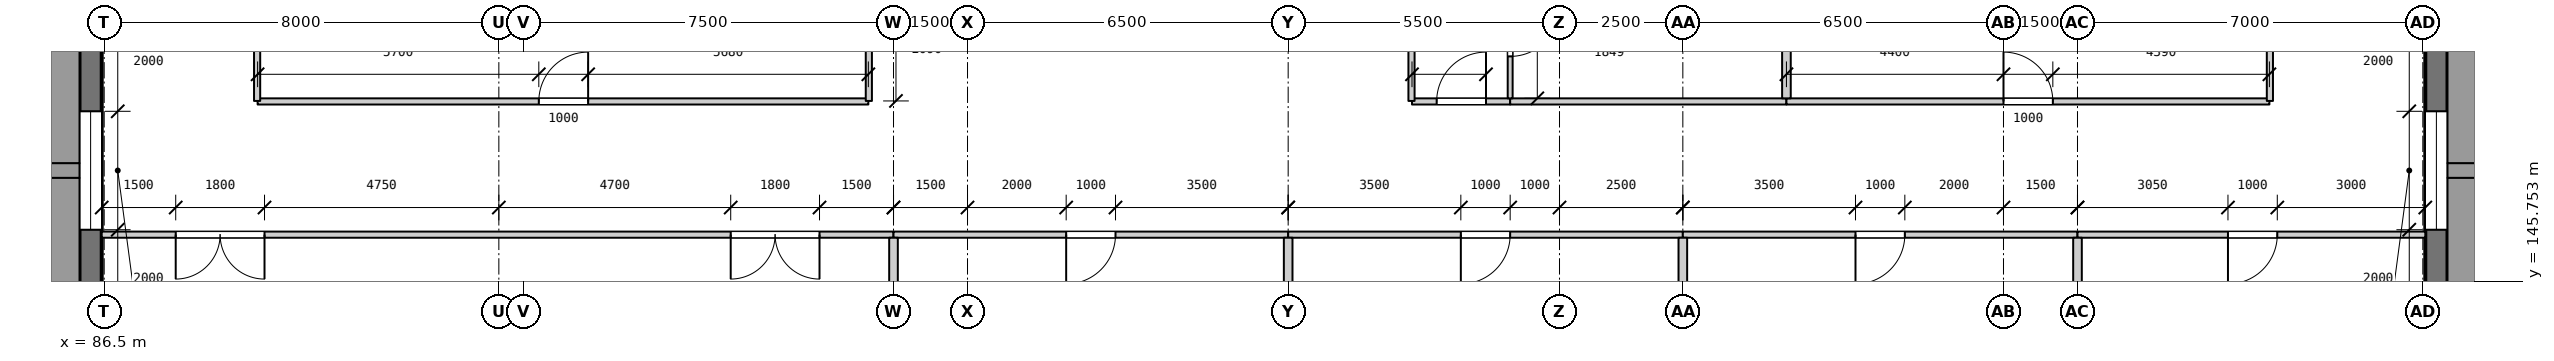
"""IFC4 building model, lengths in metres.
Left out: names, types, materials, properties, quantities, classifications, styles, units other than length and angle.
Written with IfcOpenShell. Run it as: python <this file> out.ifc"""

import sys

from ifc_helpers import new_model, si_unit, direction, frame, frame_2d, origin, place, context, subcontext, project, spatial, rectangle, extrude, element, fill, save


model = new_model("IFC4")
c1 = context("Model", 3, precision=1e-05, world=origin(), true_north=direction((0.0, 1.0)))
c2 = subcontext(c1, "Body", "Model", "MODEL_VIEW")
j1 = project(units=[si_unit("LENGTHUNIT", "METRE"), si_unit("PLANEANGLEUNIT", "RADIAN")], contexts=[c1])
p1 = place(None, origin())
s1 = spatial("IfcSite", under=j1, at=p1, CompositionType="ELEMENT")
p2 = place(p1, origin())
s2 = spatial("IfcBuilding", under=s1, at=p2, CompositionType="ELEMENT")
p3 = place(p2, frame((0.0, 0.0, 14.4)))
s3 = spatial("IfcBuildingStorey", under=s2, at=p3, CompositionType="ELEMENT", Elevation=14.4)
for number, where, z_axis, x_axis in (
    (1, (86.125, 130.25, 4.2), (0.0, 0.0, 1.0), (0.0, 1.0, 0.0)),
    (2, (133.875, 165.75, 4.2), (0.0, 0.0, 1.0), (0.0, -1.0, 0.0)),
):
    element("IfcWall", number, at=place(p3, frame(where, z_axis=z_axis, x_axis=x_axis)), inside=s3, PredefinedType="PARAPET", context=c2, shape_type="SweptSolid", body=[
        extrude(rectangle(XDim=35.5, YDim=0.25, at=frame_2d((17.75, 0.0))), origin(), (0.0, 0.0, 1.0), 1.1),
    ])
p4 = place(p3, frame((86.225, 144.8, 0.0), z_axis=(0.0, 0.0, 1.0), x_axis=(0.0, 1.0, 0.0)))
e3 = element("IfcWall", 3, at=p4, inside=s3, PredefinedType="SOLIDWALL", context=c2, shape_type="SweptSolid", body=[
    extrude(rectangle(XDim=6.4, YDim=0.45, at=frame_2d((3.2, 0.0))), origin(), (0.0, 0.0, 1.0), 3.1),
])
p5 = place(p4, frame((2.0, 0.0, 0.9)))
e4 = element("IfcOpeningElement", 4, at=p5, cuts=e3, PredefinedType="OPENING", context=c2, shape_type="SweptSolid", body=[
    extrude(rectangle(XDim=2.4, YDim=1.6, at=frame_2d((1.2, 0.8))), frame((0.0, 0.235, 0.0), z_axis=(0.0, -1.0, 0.0), x_axis=(1.0, 0.0, 0.0)), (0.0, 0.0, 1.0), 0.47),
])
p6 = place(p3, frame((133.775, 151.2, 0.0), z_axis=(0.0, 0.0, 1.0), x_axis=(0.0, -1.0, 0.0)))
e5 = element("IfcWall", 5, at=p6, inside=s3, PredefinedType="SOLIDWALL", context=c2, shape_type="SweptSolid", body=[
    extrude(rectangle(XDim=6.4, YDim=0.45, at=frame_2d((3.2, 0.0))), origin(), (0.0, 0.0, 1.0), 3.1),
])
p7 = place(p6, frame((2.0, 0.0, 0.9)))
e6 = element("IfcOpeningElement", 6, at=p7, cuts=e5, PredefinedType="OPENING", context=c2, shape_type="SweptSolid", body=[
    extrude(rectangle(XDim=2.4, YDim=1.6, at=frame_2d((1.2, 0.8))), frame((0.0, 0.235, 0.0), z_axis=(0.0, -1.0, 0.0), x_axis=(1.0, 0.0, 0.0)), (0.0, 0.0, 1.0), 0.47),
])
p8 = place(p3, frame((86.45, 146.7, 0.0), z_axis=(0.0, 0.0, 1.0), x_axis=(1.0, 0.0, 0.0)))
e7 = element("IfcWall", 7, at=p8, inside=s3, PredefinedType="PARTITIONING", context=c2, shape_type="SweptSolid", body=[
    extrude(rectangle(XDim=16.05, YDim=0.125, at=frame_2d((8.025, 0.0))), origin(), (0.0, 0.0, 1.0), 3.9),
])
p9 = place(p8, frame((1.5, 0.0, 0.0)))
e8 = element("IfcOpeningElement", 8, at=p9, cuts=e7, PredefinedType="OPENING", context=c2, shape_type="SweptSolid", body=[
    extrude(rectangle(XDim=1.8, YDim=2.1, at=frame_2d((0.9, 1.05))), frame((0.0, 0.073, 0.0), z_axis=(0.0, -1.0, 0.0), x_axis=(1.0, 0.0, 0.0)), (0.0, 0.0, 1.0), 0.145),
])
p10 = place(p8, frame((12.75, 0.0, 0.0)))
e9 = element("IfcOpeningElement", 9, at=p10, cuts=e7, PredefinedType="OPENING", context=c2, shape_type="SweptSolid", body=[
    extrude(rectangle(XDim=1.8, YDim=2.1, at=frame_2d((0.9, 1.05))), frame((0.0, 0.073, 0.0), z_axis=(0.0, -1.0, 0.0), x_axis=(1.0, 0.0, 0.0)), (0.0, 0.0, 1.0), 0.145),
])
p11 = place(p3, frame((102.5, 146.7, 0.0), z_axis=(0.0, 0.0, 1.0), x_axis=(1.0, 0.0, 0.0)))
e10 = element("IfcWall", 10, at=p11, inside=s3, PredefinedType="PARTITIONING", context=c2, shape_type="SweptSolid", body=[
    extrude(rectangle(XDim=8.0, YDim=0.125, at=frame_2d((4.0, 0.0))), origin(), (0.0, 0.0, 1.0), 3.9),
])
p12 = place(p11, frame((3.5, 0.0, 0.0)))
e11 = element("IfcOpeningElement", 11, at=p12, cuts=e10, PredefinedType="OPENING", context=c2, shape_type="SweptSolid", body=[
    extrude(rectangle(XDim=1.0, YDim=2.1, at=frame_2d((0.5, 1.05))), frame((0.0, 0.073, 0.0), z_axis=(0.0, -1.0, 0.0), x_axis=(1.0, 0.0, 0.0)), (0.0, 0.0, 1.0), 0.145),
])
p13 = place(p3, frame((110.5, 146.7, 0.0), z_axis=(0.0, 0.0, 1.0), x_axis=(1.0, 0.0, 0.0)))
e12 = element("IfcWall", 12, at=p13, inside=s3, PredefinedType="PARTITIONING", context=c2, shape_type="SweptSolid", body=[
    extrude(rectangle(XDim=8.0, YDim=0.125, at=frame_2d((4.0, 0.0))), origin(), (0.0, 0.0, 1.0), 3.9),
])
p14 = place(p13, frame((3.5, 0.0, 0.0)))
e13 = element("IfcOpeningElement", 13, at=p14, cuts=e12, PredefinedType="OPENING", context=c2, shape_type="SweptSolid", body=[
    extrude(rectangle(XDim=1.0, YDim=2.1, at=frame_2d((0.5, 1.05))), frame((0.0, 0.073, 0.0), z_axis=(0.0, -1.0, 0.0), x_axis=(1.0, 0.0, 0.0)), (0.0, 0.0, 1.0), 0.145),
])
p15 = place(p3, frame((118.5, 146.7, 0.0), z_axis=(0.0, 0.0, 1.0), x_axis=(1.0, 0.0, 0.0)))
e14 = element("IfcWall", 14, at=p15, inside=s3, PredefinedType="PARTITIONING", context=c2, shape_type="SweptSolid", body=[
    extrude(rectangle(XDim=8.0, YDim=0.125, at=frame_2d((4.0, 0.0))), origin(), (0.0, 0.0, 1.0), 3.9),
])
p16 = place(p15, frame((3.5, 0.0, 0.0)))
e15 = element("IfcOpeningElement", 15, at=p16, cuts=e14, PredefinedType="OPENING", context=c2, shape_type="SweptSolid", body=[
    extrude(rectangle(XDim=1.0, YDim=2.1, at=frame_2d((0.5, 1.05))), frame((0.0, 0.073, 0.0), z_axis=(0.0, -1.0, 0.0), x_axis=(1.0, 0.0, 0.0)), (0.0, 0.0, 1.0), 0.145),
])
p17 = place(p3, frame((126.5, 146.7, 0.0), z_axis=(0.0, 0.0, 1.0), x_axis=(1.0, 0.0, 0.0)))
e16 = element("IfcWall", 16, at=p17, inside=s3, PredefinedType="PARTITIONING", context=c2, shape_type="SweptSolid", body=[
    extrude(rectangle(XDim=7.05, YDim=0.125, at=frame_2d((3.525, 0.0))), origin(), (0.0, 0.0, 1.0), 3.9),
])
p18 = place(p17, frame((3.05, 0.0, 0.0)))
e17 = element("IfcOpeningElement", 17, at=p18, cuts=e16, PredefinedType="OPENING", context=c2, shape_type="SweptSolid", body=[
    extrude(rectangle(XDim=1.0, YDim=2.1, at=frame_2d((0.5, 1.05))), frame((0.0, 0.073, 0.0), z_axis=(0.0, -1.0, 0.0), x_axis=(1.0, 0.0, 0.0)), (0.0, 0.0, 1.0), 0.145),
])
p19 = place(p3, frame((89.61, 149.4, 0.0), z_axis=(0.0, 0.0, 1.0), x_axis=(1.0, 0.0, 0.0)))
e18 = element("IfcWall", 18, at=p19, inside=s3, PredefinedType="PARTITIONING", context=c2, shape_type="SweptSolid", body=[
    extrude(rectangle(XDim=12.38, YDim=0.125, at=frame_2d((6.19, 0.0))), origin(), (0.0, 0.0, 1.0), 3.9),
])
p20 = place(p19, frame((5.7, 0.0, 0.0)))
e19 = element("IfcOpeningElement", 19, at=p20, cuts=e18, PredefinedType="OPENING", context=c2, shape_type="SweptSolid", body=[
    extrude(rectangle(XDim=1.0, YDim=2.1, at=frame_2d((0.5, 1.05))), frame((0.0, 0.073, 0.0), z_axis=(0.0, -1.0, 0.0), x_axis=(1.0, 0.0, 0.0)), (0.0, 0.0, 1.0), 0.145),
])
p21 = place(p3, frame((113.01, 149.4, 0.0), z_axis=(0.0, 0.0, 1.0), x_axis=(1.0, 0.0, 0.0)))
e20 = element("IfcWall", 20, at=p21, inside=s3, PredefinedType="PARTITIONING", context=c2, shape_type="SweptSolid", body=[
    extrude(rectangle(XDim=1.99, YDim=0.125, at=frame_2d((0.995, 0.0))), origin(), (0.0, 0.0, 1.0), 3.9),
])
p22 = place(p21, frame((0.5, 0.0, 0.0)))
e21 = element("IfcOpeningElement", 21, at=p22, cuts=e20, PredefinedType="OPENING", context=c2, shape_type="SweptSolid", body=[
    extrude(rectangle(XDim=1.0, YDim=2.1, at=frame_2d((0.5, 1.05))), frame((0.0, 0.073, 0.0), z_axis=(0.0, -1.0, 0.0), x_axis=(1.0, 0.0, 0.0)), (0.0, 0.0, 1.0), 0.145),
])
p23 = place(p3, frame((115.0, 149.4, 0.0), z_axis=(0.0, 0.0, 1.0), x_axis=(1.0, 0.0, 0.0)))
e22 = element("IfcWall", 22, at=p23, inside=s3, PredefinedType="PARTITIONING", context=c2, shape_type="SweptSolid", body=[
    extrude(rectangle(XDim=5.6, YDim=0.125, at=frame_2d((2.8, 0.0))), origin(), (0.0, 0.0, 1.0), 3.9),
])
p24 = place(p3, frame((120.6, 149.4, 0.0), z_axis=(0.0, 0.0, 1.0), x_axis=(1.0, 0.0, 0.0)))
e23 = element("IfcWall", 23, at=p24, inside=s3, PredefinedType="PARTITIONING", context=c2, shape_type="SweptSolid", body=[
    extrude(rectangle(XDim=9.79, YDim=0.125, at=frame_2d((4.895, 0.0))), origin(), (0.0, 0.0, 1.0), 3.9),
])
p25 = place(p24, frame((4.4, 0.0, 0.0)))
e24 = element("IfcOpeningElement", 24, at=p25, cuts=e23, PredefinedType="OPENING", context=c2, shape_type="SweptSolid", body=[
    extrude(rectangle(XDim=1.0, YDim=2.1, at=frame_2d((0.5, 1.05))), frame((0.0, 0.073, 0.0), z_axis=(0.0, -1.0, 0.0), x_axis=(1.0, 0.0, 0.0)), (0.0, 0.0, 1.0), 0.145),
])
p26 = place(p3, frame((89.6, 149.41, 0.0), z_axis=(0.0, 0.0, 1.0), x_axis=(0.0, 1.0, 0.0)))
e25 = element("IfcWall", 25, at=p26, inside=s3, PredefinedType="PARTITIONING", context=c2, shape_type="SweptSolid", body=[
    extrude(rectangle(XDim=8.29, YDim=0.125, at=frame_2d((4.145, 0.0))), origin(), (0.0, 0.0, 1.0), 3.9),
])
p27 = place(p3, frame((102.0, 149.41, 0.0), z_axis=(0.0, 0.0, 1.0), x_axis=(0.0, 1.0, 0.0)))
e26 = element("IfcWall", 26, at=p27, inside=s3, PredefinedType="PARTITIONING", context=c2, shape_type="SweptSolid", body=[
    extrude(rectangle(XDim=8.29, YDim=0.125, at=frame_2d((4.145, 0.0))), origin(), (0.0, 0.0, 1.0), 3.9),
])
p28 = place(p27, frame((3.65, 0.0, 0.0)))
e27 = element("IfcOpeningElement", 27, at=p28, cuts=e26, PredefinedType="OPENING", context=c2, shape_type="SweptSolid", body=[
    extrude(rectangle(XDim=1.0, YDim=2.1, at=frame_2d((0.5, 1.05))), frame((0.0, 0.073, 0.0), z_axis=(0.0, -1.0, 0.0), x_axis=(1.0, 0.0, 0.0)), (0.0, 0.0, 1.0), 0.145),
])
for number, where, z_axis, x_axis in (
    (28, (102.5, 144.8, 0.0), (0.0, 0.0, 1.0), (0.0, 1.0, 0.0)),
    (29, (110.5, 144.8, 0.0), (0.0, 0.0, 1.0), (0.0, 1.0, 0.0)),
):
    element("IfcWall", number, at=place(p3, frame(where, z_axis=z_axis, x_axis=x_axis)), inside=s3, PredefinedType="PARTITIONING", context=c2, shape_type="SweptSolid", body=[
        extrude(rectangle(XDim=1.837, YDim=0.175, at=frame_2d((0.919, 0.0))), origin(), (0.0, 0.0, 1.0), 3.1),
    ])
p29 = place(p3, frame((113.0, 149.41, 0.0), z_axis=(0.0, 0.0, 1.0), x_axis=(0.0, 1.0, 0.0)))
e30 = element("IfcWall", 30, at=p29, inside=s3, PredefinedType="PARTITIONING", context=c2, shape_type="SweptSolid", body=[
    extrude(rectangle(XDim=8.29, YDim=0.125, at=frame_2d((4.145, 0.0))), origin(), (0.0, 0.0, 1.0), 3.9),
])
p30 = place(p3, frame((115.0, 149.462, 0.0), z_axis=(0.0, 0.0, 1.0), x_axis=(0.0, 1.0, 0.0)))
e31 = element("IfcWall", 31, at=p30, inside=s3, PredefinedType="PARTITIONING", context=c2, shape_type="SweptSolid", body=[
    extrude(rectangle(XDim=2.704, YDim=0.1, at=frame_2d((1.352, 0.0))), origin(), (0.0, 0.0, 1.0), 3.9),
])
p31 = place(p30, frame((0.85, 0.0, 0.0)))
e32 = element("IfcOpeningElement", 32, at=p31, cuts=e31, PredefinedType="OPENING", context=c2, shape_type="SweptSolid", body=[
    extrude(rectangle(XDim=1.0, YDim=2.1, at=frame_2d((0.5, 1.05))), frame((0.0, 0.06, 0.0), z_axis=(0.0, -1.0, 0.0), x_axis=(1.0, 0.0, 0.0)), (0.0, 0.0, 1.0), 0.12),
])
p32 = place(p3, frame((118.5, 144.8, 0.0), z_axis=(0.0, 0.0, 1.0), x_axis=(0.0, 1.0, 0.0)))
e33 = element("IfcWall", 33, at=p32, inside=s3, PredefinedType="PARTITIONING", context=c2, shape_type="SweptSolid", body=[
    extrude(rectangle(XDim=1.837, YDim=0.175, at=frame_2d((0.919, 0.0))), origin(), (0.0, 0.0, 1.0), 3.1),
])
p33 = place(p3, frame((120.6, 149.462, 0.0), z_axis=(0.0, 0.0, 1.0), x_axis=(0.0, 1.0, 0.0)))
e34 = element("IfcWall", 34, at=p33, inside=s3, PredefinedType="PARTITIONING", context=c2, shape_type="SweptSolid", body=[
    extrude(rectangle(XDim=2.704, YDim=0.175, at=frame_2d((1.352, 0.0))), origin(), (0.0, 0.0, 1.0), 3.9),
])
p34 = place(p3, frame((126.5, 144.8, 0.0), z_axis=(0.0, 0.0, 1.0), x_axis=(0.0, 1.0, 0.0)))
e35 = element("IfcWall", 35, at=p34, inside=s3, PredefinedType="PARTITIONING", context=c2, shape_type="SweptSolid", body=[
    extrude(rectangle(XDim=1.837, YDim=0.175, at=frame_2d((0.919, 0.0))), origin(), (0.0, 0.0, 1.0), 3.1),
])
p35 = place(p3, frame((130.4, 149.41, 0.0), z_axis=(0.0, 0.0, 1.0), x_axis=(0.0, 1.0, 0.0)))
e36 = element("IfcWall", 36, at=p35, inside=s3, PredefinedType="PARTITIONING", context=c2, shape_type="SweptSolid", body=[
    extrude(rectangle(XDim=8.29, YDim=0.125, at=frame_2d((4.145, 0.0))), origin(), (0.0, 0.0, 1.0), 3.9),
])
p36 = place(p5, origin())
e37 = element("IfcWindow", 37, at=p36, inside=s3, PartitioningType="SINGLE_PANEL", PredefinedType="WINDOW", context=c2, shape_type="SweptSolid", body=[
    extrude(rectangle(XDim=2.4, YDim=1.6, at=frame_2d((1.2, 0.8))), frame((0.0, -0.125, 0.0), z_axis=(0.0, -1.0, 0.0), x_axis=(1.0, 0.0, 0.0)), (0.0, 0.0, 1.0), 0.06),
])
fill(e4, e37)
p37 = place(p7, origin())
e38 = element("IfcWindow", 38, at=p37, inside=s3, PartitioningType="SINGLE_PANEL", PredefinedType="WINDOW", context=c2, shape_type="SweptSolid", body=[
    extrude(rectangle(XDim=2.4, YDim=1.6, at=frame_2d((1.2, 0.8))), frame((0.0, -0.125, 0.0), z_axis=(0.0, -1.0, 0.0), x_axis=(1.0, 0.0, 0.0)), (0.0, 0.0, 1.0), 0.06),
])
fill(e6, e38)
p38 = place(p9, frame((1.8, 0.0, 0.0), z_axis=(0.0, 0.0, 1.0), x_axis=(-1.0, 0.0, 0.0)))
e39 = element("IfcDoor", 39, at=p38, inside=s3, OperationType="DOUBLE_DOOR_SINGLE_SWING", PredefinedType="DOOR", context=c2, shape_type="SweptSolid", body=[
    extrude(rectangle(XDim=1.8, YDim=2.1, at=frame_2d((0.9, 1.05))), frame((0.0, 0.025, 0.0), z_axis=(0.0, -1.0, 0.0), x_axis=(1.0, 0.0, 0.0)), (0.0, 0.0, 1.0), 0.05),
])
fill(e8, e39)
p39 = place(p10, frame((1.8, 0.0, 0.0), z_axis=(0.0, 0.0, 1.0), x_axis=(-1.0, 0.0, 0.0)))
e40 = element("IfcDoor", 40, at=p39, inside=s3, OperationType="DOUBLE_DOOR_SINGLE_SWING", PredefinedType="DOOR", context=c2, shape_type="SweptSolid", body=[
    extrude(rectangle(XDim=1.8, YDim=2.1, at=frame_2d((0.9, 1.05))), frame((0.0, 0.025, 0.0), z_axis=(0.0, -1.0, 0.0), x_axis=(1.0, 0.0, 0.0)), (0.0, 0.0, 1.0), 0.05),
])
fill(e9, e40)
p40 = place(p12, frame((1.0, 0.0, 0.0), z_axis=(0.0, 0.0, 1.0), x_axis=(-1.0, 0.0, 0.0)))
e41 = element("IfcDoor", 41, at=p40, inside=s3, OperationType="SINGLE_SWING_RIGHT", PredefinedType="DOOR", context=c2, shape_type="SweptSolid", body=[
    extrude(rectangle(XDim=1.0, YDim=2.1, at=frame_2d((0.5, 1.05))), frame((0.0, 0.025, 0.0), z_axis=(0.0, -1.0, 0.0), x_axis=(1.0, 0.0, 0.0)), (0.0, 0.0, 1.0), 0.05),
])
fill(e11, e41)
p41 = place(p14, frame((1.0, 0.0, 0.0), z_axis=(0.0, 0.0, 1.0), x_axis=(-1.0, 0.0, 0.0)))
e42 = element("IfcDoor", 42, at=p41, inside=s3, OperationType="SINGLE_SWING_RIGHT", PredefinedType="DOOR", context=c2, shape_type="SweptSolid", body=[
    extrude(rectangle(XDim=1.0, YDim=2.1, at=frame_2d((0.5, 1.05))), frame((0.0, 0.025, 0.0), z_axis=(0.0, -1.0, 0.0), x_axis=(1.0, 0.0, 0.0)), (0.0, 0.0, 1.0), 0.05),
])
fill(e13, e42)
p42 = place(p16, frame((1.0, 0.0, 0.0), z_axis=(0.0, 0.0, 1.0), x_axis=(-1.0, 0.0, 0.0)))
e43 = element("IfcDoor", 43, at=p42, inside=s3, OperationType="SINGLE_SWING_RIGHT", PredefinedType="DOOR", context=c2, shape_type="SweptSolid", body=[
    extrude(rectangle(XDim=1.0, YDim=2.1, at=frame_2d((0.5, 1.05))), frame((0.0, 0.025, 0.0), z_axis=(0.0, -1.0, 0.0), x_axis=(1.0, 0.0, 0.0)), (0.0, 0.0, 1.0), 0.05),
])
fill(e15, e43)
p43 = place(p18, frame((1.0, 0.0, 0.0), z_axis=(0.0, 0.0, 1.0), x_axis=(-1.0, 0.0, 0.0)))
e44 = element("IfcDoor", 44, at=p43, inside=s3, OperationType="SINGLE_SWING_RIGHT", PredefinedType="DOOR", context=c2, shape_type="SweptSolid", body=[
    extrude(rectangle(XDim=1.0, YDim=2.1, at=frame_2d((0.5, 1.05))), frame((0.0, 0.025, 0.0), z_axis=(0.0, -1.0, 0.0), x_axis=(1.0, 0.0, 0.0)), (0.0, 0.0, 1.0), 0.05),
])
fill(e17, e44)
p44 = place(p20, origin())
e45 = element("IfcDoor", 45, at=p44, inside=s3, OperationType="SINGLE_SWING_RIGHT", PredefinedType="DOOR", context=c2, shape_type="SweptSolid", body=[
    extrude(rectangle(XDim=1.0, YDim=2.1, at=frame_2d((0.5, 1.05))), frame((0.0, 0.025, 0.0), z_axis=(0.0, -1.0, 0.0), x_axis=(1.0, 0.0, 0.0)), (0.0, 0.0, 1.0), 0.05),
])
fill(e19, e45)
p45 = place(p22, origin())
e46 = element("IfcDoor", 46, at=p45, inside=s3, OperationType="SINGLE_SWING_RIGHT", PredefinedType="DOOR", context=c2, shape_type="SweptSolid", body=[
    extrude(rectangle(XDim=1.0, YDim=2.1, at=frame_2d((0.5, 1.05))), frame((0.0, 0.025, 0.0), z_axis=(0.0, -1.0, 0.0), x_axis=(1.0, 0.0, 0.0)), (0.0, 0.0, 1.0), 0.05),
])
fill(e21, e46)
p46 = place(p25, origin())
e47 = element("IfcDoor", 47, at=p46, inside=s3, OperationType="SINGLE_SWING_LEFT", PredefinedType="DOOR", context=c2, shape_type="SweptSolid", body=[
    extrude(rectangle(XDim=1.0, YDim=2.1, at=frame_2d((0.5, 1.05))), frame((0.0, 0.025, 0.0), z_axis=(0.0, -1.0, 0.0), x_axis=(1.0, 0.0, 0.0)), (0.0, 0.0, 1.0), 0.05),
])
fill(e24, e47)
p47 = place(p31, frame((1.0, 0.0, 0.0), z_axis=(0.0, 0.0, 1.0), x_axis=(-1.0, 0.0, 0.0)))
e48 = element("IfcDoor", 48, at=p47, inside=s3, OperationType="SINGLE_SWING_LEFT", PredefinedType="DOOR", context=c2, shape_type="SweptSolid", body=[
    extrude(rectangle(XDim=1.0, YDim=2.1, at=frame_2d((0.5, 1.05))), frame((0.0, 0.025, 0.0), z_axis=(0.0, -1.0, 0.0), x_axis=(1.0, 0.0, 0.0)), (0.0, 0.0, 1.0), 0.05),
])
fill(e32, e48)
save(model, sys.argv[1])
